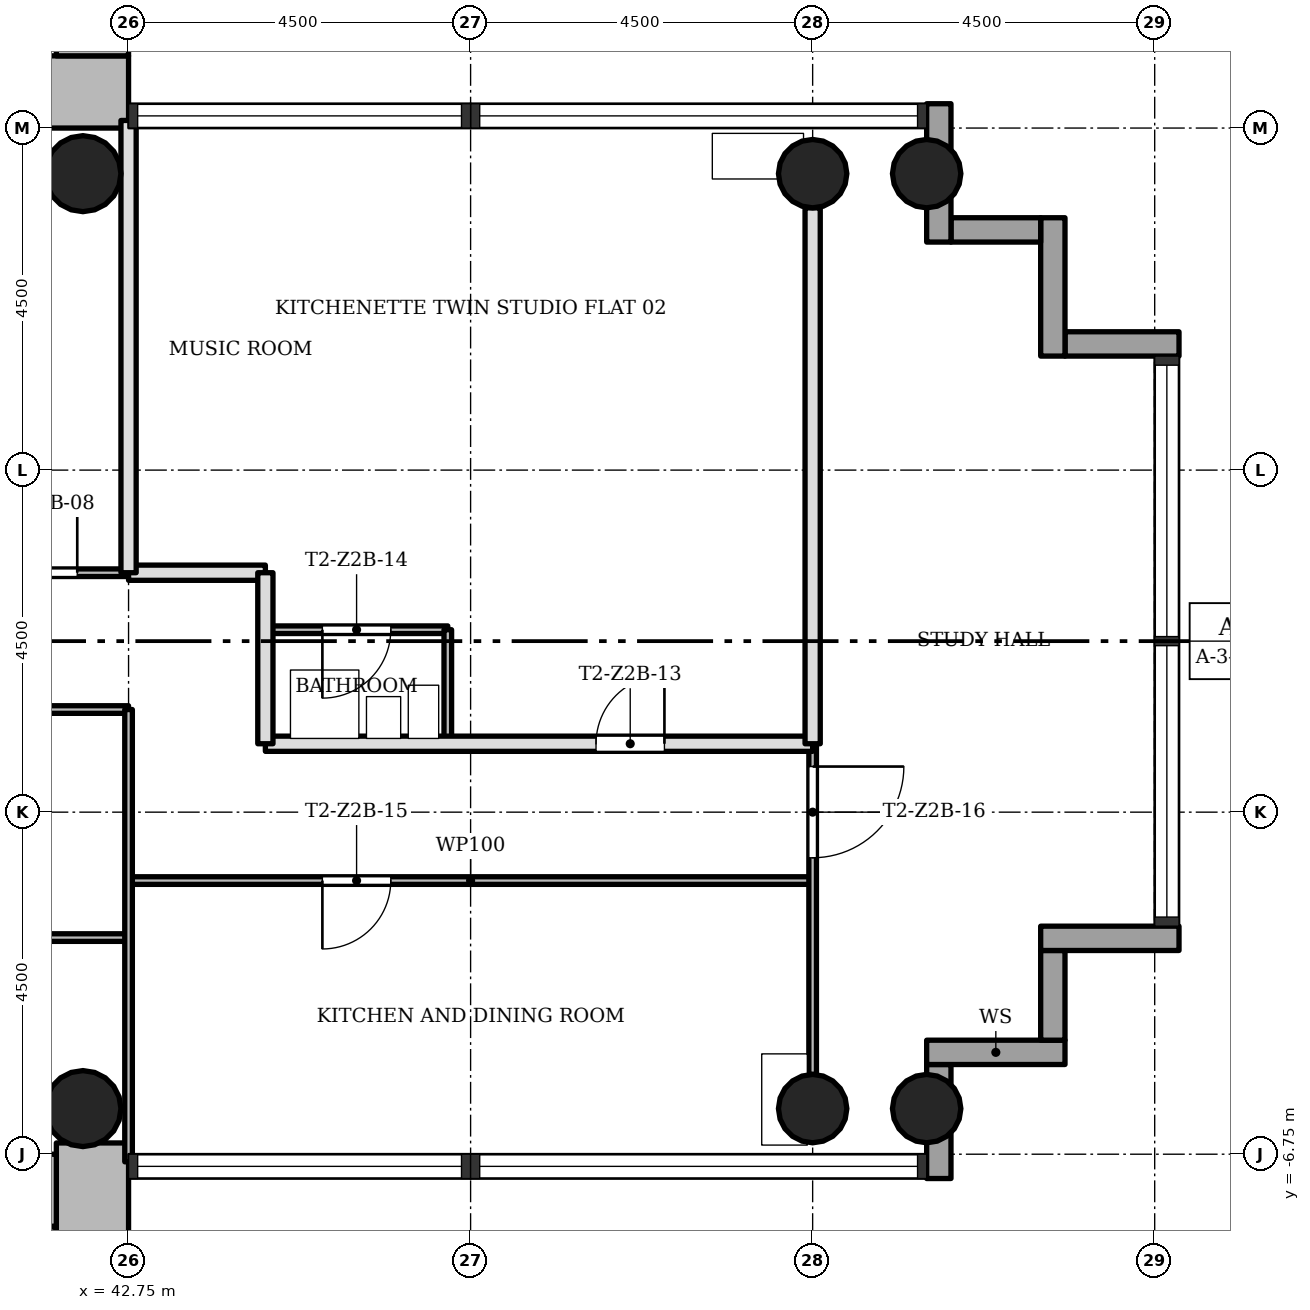
"""IFC4 building model, lengths in metres.
Left out: names, types, materials, properties, quantities, classifications, styles, units other than length and angle.
Written with IfcOpenShell. Run it as: python <this file> out.ifc"""

import sys

from ifc_helpers import new_model, si_unit, direction, frame, frame_2d, origin, origin_2d, place, context, subcontext, project, spatial, rectangle, hollow_circle, extrude, element, fill, save


model = new_model("IFC4")
c1 = context("Model", 3, precision=1e-05, world=origin(), true_north=direction((0.0, 1.0)))
c2 = subcontext(c1, "Body", "Model", "MODEL_VIEW")
j1 = project(units=[si_unit("LENGTHUNIT", "METRE"), si_unit("PLANEANGLEUNIT", "RADIAN")], contexts=[c1])
p1 = place(None, origin())
s1 = spatial("IfcSite", under=j1, at=p1, CompositionType="ELEMENT")
p2 = place(p1, origin())
s2 = spatial("IfcBuilding", under=s1, at=p2, CompositionType="ELEMENT")
p3 = place(p2, frame((0.0, 0.0, 83.4)))
s3 = spatial("IfcBuildingStorey", under=s2, at=p3, CompositionType="ELEMENT", Elevation=83.4)
p4 = place(p3, frame((30.2, 7.225, 0.0), z_axis=(0.0, 0.0, 1.0), x_axis=(1.0, 0.0, 0.0)))
e1 = element("IfcWall", 1, at=p4, inside=s3, PredefinedType="SHEAR", context=c2, shape_type="SweptSolid", body=[
    extrude(rectangle(XDim=12.55, YDim=0.95, at=frame_2d((6.275, 0.0))), origin(), (0.0, 0.0, 1.0), 3.4),
])
p5 = place(p4, frame((4.9, 0.0, 0.0)))
e2 = element("IfcOpeningElement", 2, at=p5, cuts=e1, PredefinedType="OPENING", context=c2, shape_type="SweptSolid", body=[
    extrude(rectangle(XDim=1.8, YDim=2.1, at=frame_2d((0.9, 1.05))), frame((0.0, 0.485, 0.0), z_axis=(0.0, -1.0, 0.0), x_axis=(1.0, 0.0, 0.0)), (0.0, 0.0, 1.0), 0.97),
])
p6 = place(p3, frame((42.275, 7.7, 0.0), z_axis=(0.0, 0.0, 1.0), x_axis=(0.0, 1.0, 0.0)))
e3 = element("IfcWall", 3, at=p6, inside=s3, PredefinedType="SHEAR", context=c2, shape_type="SweptSolid", body=[
    extrude(rectangle(XDim=8.05, YDim=0.95, at=frame_2d((4.025, 0.0))), origin(), (0.0, 0.0, 1.0), 3.4),
])
p7 = place(p3, frame((42.275, -14.8, 0.0), z_axis=(0.0, 0.0, 1.0), x_axis=(0.0, 1.0, 0.0)))
e4 = element("IfcWall", 4, at=p7, inside=s3, PredefinedType="SHEAR", context=c2, shape_type="SweptSolid", body=[
    extrude(rectangle(XDim=8.198, YDim=0.95, at=frame_2d((4.099, 0.0))), origin(), (0.0, 0.0, 1.0), 3.4),
])
p8 = place(p3, frame((41.8, -7.225, 0.0), z_axis=(0.0, 0.0, 1.0), x_axis=(-1.0, 0.0, 0.0)))
e5 = element("IfcWall", 5, at=p8, inside=s3, PredefinedType="SHEAR", context=c2, shape_type="SweptSolid", body=[
    extrude(rectangle(XDim=12.55, YDim=0.95, at=frame_2d((6.275, 0.0))), origin(), (0.0, 0.0, 1.0), 3.4),
])
p9 = place(p8, frame((4.9, 0.0, 0.0)))
e6 = element("IfcOpeningElement", 6, at=p9, cuts=e5, PredefinedType="OPENING", context=c2, shape_type="SweptSolid", body=[
    extrude(rectangle(XDim=1.8, YDim=2.1, at=frame_2d((0.9, 1.05))), frame((0.0, 0.485, 0.0), z_axis=(0.0, -1.0, 0.0), x_axis=(1.0, 0.0, 0.0)), (0.0, 0.0, 1.0), 0.97),
])
for number, where, z_axis, x_axis in (
    (7, (51.75, -6.15, 0.0), (0.0, 0.0, 1.0), (1.0, 0.0, 0.0)),
    (8, (51.75, 6.15, 0.0), (0.0, 0.0, 1.0), (1.0, 0.0, 0.0)),
    (9, (53.25, -6.15, 0.0), (0.0, 0.0, 1.0), (1.0, 0.0, 0.0)),
    (10, (53.25, 6.15, 0.0), (0.0, 0.0, 1.0), (1.0, 0.0, 0.0)),
):
    element("IfcColumn", number, at=place(p3, frame(where, z_axis=z_axis, x_axis=x_axis)), inside=s3, PredefinedType="COLUMN", context=c2, shape_type="SweptSolid", body=[
        extrude(hollow_circle(Radius=0.45, WallThickness=0.032, at=origin_2d()), origin(), (0.0, 0.0, 1.0), 3.4),
    ])
for number, where, z_axis, x_axis in (
    (11, (42.15, -6.15, 0.0), (0.0, 0.0, 1.0), (1.0, 0.0, 0.0)),
    (12, (42.15, 6.15, 0.0), (0.0, 0.0, 1.0), (1.0, 0.0, 0.0)),
):
    element("IfcColumn", number, at=place(p3, frame(where, z_axis=z_axis, x_axis=x_axis)), inside=s3, PredefinedType="COLUMN", context=c2, shape_type="SweptSolid", body=[
        extrude(hollow_circle(Radius=0.5, WallThickness=0.036, at=origin_2d()), origin(), (0.0, 0.0, 1.0), 3.4),
    ])
p10 = place(p3, frame((53.41, -7.07, -0.3), z_axis=(0.0, 0.0, 1.0), x_axis=(0.0, 1.0, 0.0)))
e13 = element("IfcWall", 13, at=p10, inside=s3, PredefinedType="STANDARD", context=c2, shape_type="SweptSolid", body=[
    extrude(rectangle(XDim=1.5, YDim=0.32, at=frame_2d((0.75, 0.0))), origin(), (0.0, 0.0, 1.0), 3.4),
])
p11 = place(p3, frame((53.25, -5.41, -0.3), z_axis=(0.0, 0.0, 1.0), x_axis=(1.0, 0.0, 0.0)))
e14 = element("IfcWall", 14, at=p11, inside=s3, PredefinedType="STANDARD", context=c2, shape_type="SweptSolid", body=[
    extrude(rectangle(XDim=1.82, YDim=0.32, at=frame_2d((0.91, 0.0))), origin(), (0.0, 0.0, 1.0), 3.4),
])
p12 = place(p3, frame((54.91, -5.25, -0.3), z_axis=(0.0, 0.0, 1.0), x_axis=(0.0, 1.0, 0.0)))
e15 = element("IfcWall", 15, at=p12, inside=s3, PredefinedType="STANDARD", context=c2, shape_type="SweptSolid", body=[
    extrude(rectangle(XDim=1.18, YDim=0.32, at=frame_2d((0.59, 0.0))), origin(), (0.0, 0.0, 1.0), 3.4),
])
p13 = place(p3, frame((54.75, -3.91, -0.3), z_axis=(0.0, 0.0, 1.0), x_axis=(1.0, 0.0, 0.0)))
e16 = element("IfcWall", 16, at=p13, inside=s3, PredefinedType="STANDARD", context=c2, shape_type="SweptSolid", body=[
    extrude(rectangle(XDim=1.82, YDim=0.32, at=frame_2d((0.91, 0.0))), origin(), (0.0, 0.0, 1.0), 3.4),
])
p14 = place(p3, frame((56.57, 3.91, -0.3), z_axis=(0.0, 0.0, 1.0), x_axis=(-1.0, 0.0, 0.0)))
e17 = element("IfcWall", 17, at=p14, inside=s3, PredefinedType="STANDARD", context=c2, shape_type="SweptSolid", body=[
    extrude(rectangle(XDim=1.5, YDim=0.32, at=frame_2d((0.75, 0.0))), origin(), (0.0, 0.0, 1.0), 3.4),
])
p15 = place(p3, frame((54.91, 3.75, -0.3), z_axis=(0.0, 0.0, 1.0), x_axis=(0.0, 1.0, 0.0)))
e18 = element("IfcWall", 18, at=p15, inside=s3, PredefinedType="STANDARD", context=c2, shape_type="SweptSolid", body=[
    extrude(rectangle(XDim=1.82, YDim=0.32, at=frame_2d((0.91, 0.0))), origin(), (0.0, 0.0, 1.0), 3.4),
])
p16 = place(p3, frame((54.75, 5.41, -0.3), z_axis=(0.0, 0.0, 1.0), x_axis=(-1.0, 0.0, 0.0)))
e19 = element("IfcWall", 19, at=p16, inside=s3, PredefinedType="STANDARD", context=c2, shape_type="SweptSolid", body=[
    extrude(rectangle(XDim=1.18, YDim=0.32, at=frame_2d((0.59, 0.0))), origin(), (0.0, 0.0, 1.0), 3.4),
])
p17 = place(p3, frame((53.41, 5.25, -0.3), z_axis=(0.0, 0.0, 1.0), x_axis=(0.0, 1.0, 0.0)))
e20 = element("IfcWall", 20, at=p17, inside=s3, PredefinedType="STANDARD", context=c2, shape_type="SweptSolid", body=[
    extrude(rectangle(XDim=1.82, YDim=0.32, at=frame_2d((0.91, 0.0))), origin(), (0.0, 0.0, 1.0), 3.4),
])
p18 = place(p3, frame((42.75, -3.9, 0.0), z_axis=(0.0, 0.0, 1.0), x_axis=(-1.0, 0.0, 0.0)))
e21 = element("IfcWall", 21, at=p18, inside=s3, PredefinedType="PARTITIONING", context=c2, shape_type="SweptSolid", body=[
    extrude(rectangle(XDim=5.25, YDim=0.1, at=frame_2d((2.625, 0.0))), origin(), (0.0, 0.0, 1.0), 3.0),
])
p19 = place(p3, frame((51.75, -3.15, 0.0), z_axis=(0.0, 0.0, 1.0), x_axis=(-1.0, 0.0, 0.0)))
e22 = element("IfcWall", 22, at=p19, inside=s3, PredefinedType="PARTITIONING", context=c2, shape_type="SweptSolid", body=[
    extrude(rectangle(XDim=9.0, YDim=0.1, at=frame_2d((4.5, 0.0))), origin(), (0.0, 0.0, 1.0), 3.0),
])
p20 = place(p19, frame((5.55, 0.0, 0.0)))
e23 = element("IfcOpeningElement", 23, at=p20, cuts=e22, PredefinedType="OPENING", context=c2, shape_type="SweptSolid", body=[
    extrude(rectangle(XDim=0.9, YDim=2.1, at=frame_2d((0.45, 1.05))), frame((0.0, 0.06, 0.0), z_axis=(0.0, -1.0, 0.0), x_axis=(1.0, 0.0, 0.0)), (0.0, 0.0, 1.0), 0.12),
])
p21 = place(p3, frame((51.75, -1.35, 0.0), z_axis=(0.0, 0.0, 1.0), x_axis=(-1.0, 0.0, 0.0)))
e24 = element("IfcWall", 24, at=p21, inside=s3, PredefinedType="SOLIDWALL", context=c2, shape_type="SweptSolid", body=[
    extrude(rectangle(XDim=7.2, YDim=0.2, at=frame_2d((3.6, 0.0))), origin(), (0.0, 0.0, 1.0), 3.0),
])
p22 = place(p21, frame((1.95, 0.0, 0.0)))
e25 = element("IfcOpeningElement", 25, at=p22, cuts=e24, PredefinedType="OPENING", context=c2, shape_type="SweptSolid", body=[
    extrude(rectangle(XDim=0.9, YDim=2.1, at=frame_2d((0.45, 1.05))), frame((0.0, 0.11, 0.0), z_axis=(0.0, -1.0, 0.0), x_axis=(1.0, 0.0, 0.0)), (0.0, 0.0, 1.0), 0.22),
])
p23 = place(p3, frame((42.75, -0.9, 0.0), z_axis=(0.0, 0.0, 1.0), x_axis=(-1.0, 0.0, 0.0)))
e26 = element("IfcWall", 26, at=p23, inside=s3, PredefinedType="PARTITIONING", context=c2, shape_type="SweptSolid", body=[
    extrude(rectangle(XDim=5.25, YDim=0.1, at=frame_2d((2.625, 0.0))), origin(), (0.0, 0.0, 1.0), 3.0),
])
p24 = place(p23, frame((2.175, 0.0, 0.0)))
e27 = element("IfcOpeningElement", 27, at=p24, cuts=e26, PredefinedType="OPENING", context=c2, shape_type="SweptSolid", body=[
    extrude(rectangle(XDim=0.9, YDim=2.1, at=frame_2d((0.45, 1.05))), frame((0.0, 0.06, 0.0), z_axis=(0.0, -1.0, 0.0), x_axis=(1.0, 0.0, 0.0)), (0.0, 0.0, 1.0), 0.12),
])
p25 = place(p3, frame((46.95, 0.15, 0.0), z_axis=(0.0, 0.0, 1.0), x_axis=(-1.0, 0.0, 0.0)))
e28 = element("IfcWall", 28, at=p25, inside=s3, PredefinedType="PARTITIONING", context=c2, shape_type="SweptSolid", body=[
    extrude(rectangle(XDim=2.4, YDim=0.1, at=frame_2d((1.2, 0.0))), origin(), (0.0, 0.0, 1.0), 3.0),
])
p26 = place(p25, frame((0.75, 0.0, 0.0)))
e29 = element("IfcOpeningElement", 29, at=p26, cuts=e28, PredefinedType="OPENING", context=c2, shape_type="SweptSolid", body=[
    extrude(rectangle(XDim=0.9, YDim=2.1, at=frame_2d((0.45, 1.05))), frame((0.0, 0.06, 0.0), z_axis=(0.0, -1.0, 0.0), x_axis=(1.0, 0.0, 0.0)), (0.0, 0.0, 1.0), 0.12),
])
p27 = place(p3, frame((42.75, 0.9, 0.0), z_axis=(0.0, 0.0, 1.0), x_axis=(-1.0, 0.0, 0.0)))
e30 = element("IfcWall", 30, at=p27, inside=s3, PredefinedType="PARTITIONING", context=c2, shape_type="SweptSolid", body=[
    extrude(rectangle(XDim=5.25, YDim=0.1, at=frame_2d((2.625, 0.0))), origin(), (0.0, 0.0, 1.0), 3.0),
])
p28 = place(p27, frame((0.675, 0.0, 0.0)))
e31 = element("IfcOpeningElement", 31, at=p28, cuts=e30, PredefinedType="OPENING", context=c2, shape_type="SweptSolid", body=[
    extrude(rectangle(XDim=0.9, YDim=2.1, at=frame_2d((0.45, 1.05))), frame((0.0, 0.06, 0.0), z_axis=(0.0, -1.0, 0.0), x_axis=(1.0, 0.0, 0.0)), (0.0, 0.0, 1.0), 0.12),
])
p29 = place(p3, frame((44.55, 0.9, 0.0), z_axis=(0.0, 0.0, 1.0), x_axis=(-1.0, 0.0, 0.0)))
e32 = element("IfcWall", 32, at=p29, inside=s3, PredefinedType="SOLIDWALL", context=c2, shape_type="SweptSolid", body=[
    extrude(rectangle(XDim=1.8, YDim=0.2, at=frame_2d((0.9, 0.0))), origin(), (0.0, 0.0, 1.0), 3.0),
])
p30 = place(p3, frame((51.75, -5.7, 0.0), z_axis=(0.0, 0.0, 1.0), x_axis=(0.0, 1.0, 0.0)))
e33 = element("IfcWall", 33, at=p30, inside=s3, PredefinedType="PARTITIONING", context=c2, shape_type="SweptSolid", body=[
    extrude(rectangle(XDim=4.35, YDim=0.1, at=frame_2d((2.175, 0.0))), origin(), (0.0, 0.0, 1.0), 3.0),
])
p31 = place(p30, frame((2.85, 0.0, 0.0)))
e34 = element("IfcOpeningElement", 34, at=p31, cuts=e33, PredefinedType="OPENING", context=c2, shape_type="SweptSolid", body=[
    extrude(rectangle(XDim=1.2, YDim=2.1, at=frame_2d((0.6, 1.05))), frame((0.0, 0.06, 0.0), z_axis=(0.0, -1.0, 0.0), x_axis=(1.0, 0.0, 0.0)), (0.0, 0.0, 1.0), 0.12),
])
p32 = place(p3, frame((51.75, -1.35, 0.0), z_axis=(0.0, 0.0, 1.0), x_axis=(0.0, 1.0, 0.0)))
e35 = element("IfcWall", 35, at=p32, inside=s3, PredefinedType="SOLIDWALL", context=c2, shape_type="SweptSolid", body=[
    extrude(rectangle(XDim=7.05, YDim=0.2, at=frame_2d((3.525, 0.0))), origin(), (0.0, 0.0, 1.0), 3.0),
])
p33 = place(p3, frame((46.95, -1.35, 0.0), z_axis=(0.0, 0.0, 1.0), x_axis=(0.0, 1.0, 0.0)))
e36 = element("IfcWall", 36, at=p33, inside=s3, PredefinedType="PARTITIONING", context=c2, shape_type="SweptSolid", body=[
    extrude(rectangle(XDim=1.5, YDim=0.1, at=frame_2d((0.75, 0.0))), origin(), (0.0, 0.0, 1.0), 3.0),
])
p34 = place(p3, frame((44.55, -1.35, 0.0), z_axis=(0.0, 0.0, 1.0), x_axis=(0.0, 1.0, 0.0)))
e37 = element("IfcWall", 37, at=p34, inside=s3, PredefinedType="SOLIDWALL", context=c2, shape_type="SweptSolid", body=[
    extrude(rectangle(XDim=2.25, YDim=0.2, at=frame_2d((1.125, 0.0))), origin(), (0.0, 0.0, 1.0), 3.0),
])
p35 = place(p3, frame((42.75, -6.85, 0.0), z_axis=(0.0, 0.0, 1.0), x_axis=(0.0, 1.0, 0.0)))
e38 = element("IfcWall", 38, at=p35, inside=s3, PredefinedType="PARTITIONING", context=c2, shape_type="SweptSolid", body=[
    extrude(rectangle(XDim=5.95, YDim=0.1, at=frame_2d((2.975, 0.0))), origin(), (0.0, 0.0, 1.0), 3.0),
])
p36 = place(p3, frame((42.75, 0.9, 0.0), z_axis=(0.0, 0.0, 1.0), x_axis=(0.0, 1.0, 0.0)))
e39 = element("IfcWall", 39, at=p36, inside=s3, PredefinedType="SOLIDWALL", context=c2, shape_type="SweptSolid", body=[
    extrude(rectangle(XDim=5.95, YDim=0.2, at=frame_2d((2.975, 0.0))), origin(), (0.0, 0.0, 1.0), 3.0),
])
p37 = place(p3, frame((37.9, -7.825, 0.0), z_axis=(0.0, 0.0, 1.0), x_axis=(1.0, 0.0, 0.0)))
e40 = element("IfcWall", 40, at=p37, inside=s3, PredefinedType="SHEAR", context=c2, shape_type="SweptSolid", body=[
    extrude(rectangle(XDim=3.9, YDim=0.25, at=frame_2d((1.95, 0.0))), origin(), (0.0, 0.0, 1.0), 3.4),
])
p38 = place(p28, origin())
e41 = element("IfcDoor", 41, at=p38, inside=s3, OperationType="SINGLE_SWING_LEFT", PredefinedType="DOOR", context=c2, shape_type="SweptSolid", body=[
    extrude(rectangle(XDim=0.9, YDim=2.1, at=frame_2d((0.45, 1.05))), frame((0.0, 0.025, 0.0), z_axis=(0.0, -1.0, 0.0), x_axis=(1.0, 0.0, 0.0)), (0.0, 0.0, 1.0), 0.05),
])
fill(e31, e41)
p39 = place(p22, origin())
e42 = element("IfcDoor", 42, at=p39, inside=s3, OperationType="SINGLE_SWING_LEFT", PredefinedType="DOOR", context=c2, shape_type="SweptSolid", body=[
    extrude(rectangle(XDim=0.9, YDim=2.1, at=frame_2d((0.45, 1.05))), frame((0.0, 0.025, 0.0), z_axis=(0.0, -1.0, 0.0), x_axis=(1.0, 0.0, 0.0)), (0.0, 0.0, 1.0), 0.05),
])
fill(e25, e42)
p40 = place(p26, origin())
e43 = element("IfcDoor", 43, at=p40, inside=s3, OperationType="SINGLE_SWING_LEFT", PredefinedType="DOOR", context=c2, shape_type="SweptSolid", body=[
    extrude(rectangle(XDim=0.9, YDim=2.1, at=frame_2d((0.45, 1.05))), frame((0.0, 0.025, 0.0), z_axis=(0.0, -1.0, 0.0), x_axis=(1.0, 0.0, 0.0)), (0.0, 0.0, 1.0), 0.05),
])
fill(e29, e43)
p41 = place(p20, origin())
e44 = element("IfcDoor", 44, at=p41, inside=s3, OperationType="SINGLE_SWING_LEFT", PredefinedType="DOOR", context=c2, shape_type="SweptSolid", body=[
    extrude(rectangle(XDim=0.9, YDim=2.1, at=frame_2d((0.45, 1.05))), frame((0.0, 0.025, 0.0), z_axis=(0.0, -1.0, 0.0), x_axis=(1.0, 0.0, 0.0)), (0.0, 0.0, 1.0), 0.05),
])
fill(e23, e44)
p42 = place(p31, origin())
e45 = element("IfcDoor", 45, at=p42, inside=s3, OperationType="SINGLE_SWING_RIGHT", PredefinedType="DOOR", context=c2, shape_type="SweptSolid", body=[
    extrude(rectangle(XDim=1.2, YDim=2.1, at=frame_2d((0.6, 1.05))), frame((0.0, 0.025, 0.0), z_axis=(0.0, -1.0, 0.0), x_axis=(1.0, 0.0, 0.0)), (0.0, 0.0, 1.0), 0.05),
])
fill(e34, e45)
save(model, sys.argv[1])
